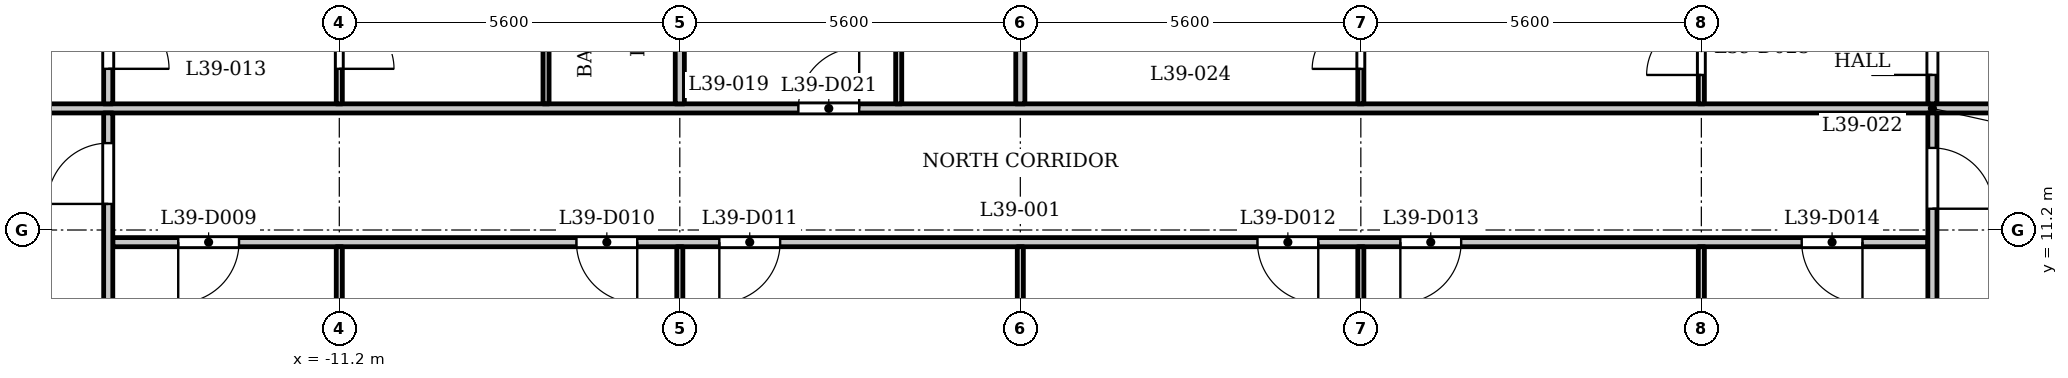
"""IFC4 building model, lengths in metres.
Left out: names, types, materials, properties, quantities, classifications, styles, units other than length and angle.
Written with IfcOpenShell. Run it as: python <this file> out.ifc"""

import sys

from ifc_helpers import new_model, si_unit, direction, frame, frame_2d, origin, place, context, subcontext, project, spatial, rectangle, extrude, element, fill, save


model = new_model("IFC4")
c1 = context("Model", 3, precision=1e-05, world=origin(), true_north=direction((0.0, 1.0)))
c2 = subcontext(c1, "Body", "Model", "MODEL_VIEW")
j1 = project(units=[si_unit("LENGTHUNIT", "METRE"), si_unit("PLANEANGLEUNIT", "RADIAN")], contexts=[c1])
p1 = place(None, origin())
s1 = spatial("IfcSite", under=j1, at=p1, CompositionType="ELEMENT")
p2 = place(p1, origin())
s2 = spatial("IfcBuilding", under=s1, at=p2, CompositionType="ELEMENT")
p3 = place(p2, frame((0.0, 0.0, 153.6)))
s3 = spatial("IfcBuildingStorey", under=s2, at=p3, CompositionType="ELEMENT", Elevation=153.6)
p4 = place(p3, frame((-14.925, 11.0, 0.0), z_axis=(0.0, 0.0, 1.0), x_axis=(1.0, 0.0, 0.0)))
e1 = element("IfcWall", 1, at=p4, inside=s3, PredefinedType="PARTITIONING", context=c2, shape_type="SweptSolid", body=[
    extrude(rectangle(XDim=29.85, YDim=0.15, at=frame_2d((14.925, 0.0))), origin(), (0.0, 0.0, 1.0), 3.2),
])
p5 = place(p4, frame((1.076, 0.0, 0.0)))
e2 = element("IfcOpeningElement", 2, at=p5, cuts=e1, PredefinedType="OPENING", context=c2, shape_type="SweptSolid", body=[
    extrude(rectangle(XDim=1.0, YDim=2.1, at=frame_2d((0.5, 1.05))), frame((0.0, 0.085, 0.0), z_axis=(0.0, -1.0, 0.0), x_axis=(1.0, 0.0, 0.0)), (0.0, 0.0, 1.0), 0.17),
])
p6 = place(p4, frame((7.625, 0.0, 0.0)))
e3 = element("IfcOpeningElement", 3, at=p6, cuts=e1, PredefinedType="OPENING", context=c2, shape_type="SweptSolid", body=[
    extrude(rectangle(XDim=1.0, YDim=2.1, at=frame_2d((0.5, 1.05))), frame((0.0, 0.085, 0.0), z_axis=(0.0, -1.0, 0.0), x_axis=(1.0, 0.0, 0.0)), (0.0, 0.0, 1.0), 0.17),
])
p7 = place(p4, frame((9.975, 0.0, 0.0)))
e4 = element("IfcOpeningElement", 4, at=p7, cuts=e1, PredefinedType="OPENING", context=c2, shape_type="SweptSolid", body=[
    extrude(rectangle(XDim=1.0, YDim=2.1, at=frame_2d((0.5, 1.05))), frame((0.0, 0.085, 0.0), z_axis=(0.0, -1.0, 0.0), x_axis=(1.0, 0.0, 0.0)), (0.0, 0.0, 1.0), 0.17),
])
p8 = place(p4, frame((18.825, 0.0, 0.0)))
e5 = element("IfcOpeningElement", 5, at=p8, cuts=e1, PredefinedType="OPENING", context=c2, shape_type="SweptSolid", body=[
    extrude(rectangle(XDim=1.0, YDim=2.1, at=frame_2d((0.5, 1.05))), frame((0.0, 0.085, 0.0), z_axis=(0.0, -1.0, 0.0), x_axis=(1.0, 0.0, 0.0)), (0.0, 0.0, 1.0), 0.17),
])
p9 = place(p4, frame((21.175, 0.0, 0.0)))
e6 = element("IfcOpeningElement", 6, at=p9, cuts=e1, PredefinedType="OPENING", context=c2, shape_type="SweptSolid", body=[
    extrude(rectangle(XDim=1.0, YDim=2.1, at=frame_2d((0.5, 1.05))), frame((0.0, 0.085, 0.0), z_axis=(0.0, -1.0, 0.0), x_axis=(1.0, 0.0, 0.0)), (0.0, 0.0, 1.0), 0.17),
])
p10 = place(p4, frame((27.775, 0.0, 0.0)))
e7 = element("IfcOpeningElement", 7, at=p10, cuts=e1, PredefinedType="OPENING", context=c2, shape_type="SweptSolid", body=[
    extrude(rectangle(XDim=1.0, YDim=2.1, at=frame_2d((0.5, 1.05))), frame((0.0, 0.085, 0.0), z_axis=(0.0, -1.0, 0.0), x_axis=(1.0, 0.0, 0.0)), (0.0, 0.0, 1.0), 0.17),
])
p11 = place(p3, frame((-17.4, 13.2, 0.0), z_axis=(0.0, 0.0, 1.0), x_axis=(1.0, 0.0, 0.0)))
e8 = element("IfcWall", 8, at=p11, inside=s3, PredefinedType="PARTITIONING", context=c2, shape_type="SweptSolid", body=[
    extrude(rectangle(XDim=34.8, YDim=0.15, at=frame_2d((17.4, 0.0))), origin(), (0.0, 0.0, 1.0), 3.2),
])
p12 = place(p11, frame((0.25, 0.0, 0.0)))
e9 = element("IfcOpeningElement", 9, at=p12, cuts=e8, PredefinedType="OPENING", context=c2, shape_type="SweptSolid", body=[
    extrude(rectangle(XDim=1.0, YDim=2.1, at=frame_2d((0.5, 1.05))), frame((0.0, 0.085, 0.0), z_axis=(0.0, -1.0, 0.0), x_axis=(1.0, 0.0, 0.0)), (0.0, 0.0, 1.0), 0.17),
])
p13 = place(p11, frame((33.65, 0.0, 0.0)))
e10 = element("IfcOpeningElement", 10, at=p13, cuts=e8, PredefinedType="OPENING", context=c2, shape_type="SweptSolid", body=[
    extrude(rectangle(XDim=1.0, YDim=2.1, at=frame_2d((0.5, 1.05))), frame((0.0, 0.085, 0.0), z_axis=(0.0, -1.0, 0.0), x_axis=(1.0, 0.0, 0.0)), (0.0, 0.0, 1.0), 0.17),
])
p14 = place(p11, frame((13.75, 0.0, 0.0)))
e11 = element("IfcOpeningElement", 11, at=p14, cuts=e8, PredefinedType="OPENING", context=c2, shape_type="SweptSolid", body=[
    extrude(rectangle(XDim=1.0, YDim=2.1, at=frame_2d((0.5, 1.05))), frame((0.0, 0.085, 0.0), z_axis=(0.0, -1.0, 0.0), x_axis=(1.0, 0.0, 0.0)), (0.0, 0.0, 1.0), 0.17),
])
p15 = place(p3, frame((-15.0, 6.769, 0.0), z_axis=(0.0, 0.0, 1.0), x_axis=(0.0, 1.0, 0.0)))
e12 = element("IfcWall", 12, at=p15, inside=s3, PredefinedType="PARTITIONING", context=c2, shape_type="SweptSolid", body=[
    extrude(rectangle(XDim=6.356, YDim=0.15, at=frame_2d((3.178, 0.0))), origin(), (0.0, 0.0, 1.0), 3.2),
])
p16 = place(p15, frame((4.86, 0.0, 0.0)))
e13 = element("IfcOpeningElement", 13, at=p16, cuts=e12, PredefinedType="OPENING", context=c2, shape_type="SweptSolid", body=[
    extrude(rectangle(XDim=1.0, YDim=2.1, at=frame_2d((0.5, 1.05))), frame((0.0, 0.085, 0.0), z_axis=(0.0, -1.0, 0.0), x_axis=(1.0, 0.0, 0.0)), (0.0, 0.0, 1.0), 0.17),
])
p17 = place(p3, frame((-15.0, 13.275, 0.0), z_axis=(0.0, 0.0, 1.0), x_axis=(0.0, 1.0, 0.0)))
e14 = element("IfcWall", 14, at=p17, inside=s3, PredefinedType="PARTITIONING", context=c2, shape_type="SweptSolid", body=[
    extrude(rectangle(XDim=2.05, YDim=0.15, at=frame_2d((1.025, 0.0))), origin(), (0.0, 0.0, 1.0), 3.2),
])
p18 = place(p17, frame((0.576, 0.0, 0.0)))
e15 = element("IfcOpeningElement", 15, at=p18, cuts=e14, PredefinedType="OPENING", context=c2, shape_type="SweptSolid", body=[
    extrude(rectangle(XDim=1.0, YDim=2.1, at=frame_2d((0.5, 1.05))), frame((0.0, 0.085, 0.0), z_axis=(0.0, -1.0, 0.0), x_axis=(1.0, 0.0, 0.0)), (0.0, 0.0, 1.0), 0.17),
])
p19 = place(p3, frame((-11.2, 7.32, 0.0), z_axis=(0.0, 0.0, 1.0), x_axis=(0.0, 1.0, 0.0)))
e16 = element("IfcWall", 16, at=p19, inside=s3, PredefinedType="PARTITIONING", context=c2, shape_type="SweptSolid", body=[
    extrude(rectangle(XDim=3.605, YDim=0.1, at=frame_2d((1.802, 0.0))), origin(), (0.0, 0.0, 1.0), 3.2),
])
p20 = place(p3, frame((-11.2, 13.275, 0.0), z_axis=(0.0, 0.0, 1.0), x_axis=(0.0, 1.0, 0.0)))
e17 = element("IfcWall", 17, at=p20, inside=s3, PredefinedType="PARTITIONING", context=c2, shape_type="SweptSolid", body=[
    extrude(rectangle(XDim=3.475, YDim=0.1, at=frame_2d((1.738, 0.0))), origin(), (0.0, 0.0, 1.0), 3.2),
])
p21 = place(p20, frame((0.576, 0.0, 0.0)))
e18 = element("IfcOpeningElement", 18, at=p21, cuts=e17, PredefinedType="OPENING", context=c2, shape_type="SweptSolid", body=[
    extrude(rectangle(XDim=0.9, YDim=2.1, at=frame_2d((0.45, 1.05))), frame((0.0, 0.06, 0.0), z_axis=(0.0, -1.0, 0.0), x_axis=(1.0, 0.0, 0.0)), (0.0, 0.0, 1.0), 0.12),
])
p22 = place(p3, frame((-7.8, 13.275, 0.0), z_axis=(0.0, 0.0, 1.0), x_axis=(0.0, 1.0, 0.0)))
e19 = element("IfcWall", 19, at=p22, inside=s3, PredefinedType="PARTITIONING", context=c2, shape_type="SweptSolid", body=[
    extrude(rectangle(XDim=3.475, YDim=0.1, at=frame_2d((1.738, 0.0))), origin(), (0.0, 0.0, 1.0), 3.2),
])
p23 = place(p3, frame((-5.6, 7.32, 0.0), z_axis=(0.0, 0.0, 1.0), x_axis=(0.0, 1.0, 0.0)))
e20 = element("IfcWall", 20, at=p23, inside=s3, PredefinedType="PARTITIONING", context=c2, shape_type="SweptSolid", body=[
    extrude(rectangle(XDim=3.605, YDim=0.1, at=frame_2d((1.802, 0.0))), origin(), (0.0, 0.0, 1.0), 3.2),
])
p24 = place(p3, frame((-5.6, 13.275, 0.0), z_axis=(0.0, 0.0, 1.0), x_axis=(0.0, 1.0, 0.0)))
e21 = element("IfcWall", 21, at=p24, inside=s3, PredefinedType="PARTITIONING", context=c2, shape_type="SweptSolid", body=[
    extrude(rectangle(XDim=3.475, YDim=0.15, at=frame_2d((1.738, 0.0))), origin(), (0.0, 0.0, 1.0), 3.2),
])
p25 = place(p3, frame((-2.0, 13.275, 0.0), z_axis=(0.0, 0.0, 1.0), x_axis=(0.0, 1.0, 0.0)))
e22 = element("IfcWall", 22, at=p25, inside=s3, PredefinedType="PARTITIONING", context=c2, shape_type="SweptSolid", body=[
    extrude(rectangle(XDim=3.475, YDim=0.1, at=frame_2d((1.738, 0.0))), origin(), (0.0, 0.0, 1.0), 3.2),
])
p26 = place(p3, frame((0.0, 7.32, 0.0), z_axis=(0.0, 0.0, 1.0), x_axis=(0.0, 1.0, 0.0)))
e23 = element("IfcWall", 23, at=p26, inside=s3, PredefinedType="PARTITIONING", context=c2, shape_type="SweptSolid", body=[
    extrude(rectangle(XDim=3.605, YDim=0.1, at=frame_2d((1.802, 0.0))), origin(), (0.0, 0.0, 1.0), 3.2),
])
p27 = place(p3, frame((0.0, 13.275, 0.0), z_axis=(0.0, 0.0, 1.0), x_axis=(0.0, 1.0, 0.0)))
e24 = element("IfcWall", 24, at=p27, inside=s3, PredefinedType="PARTITIONING", context=c2, shape_type="SweptSolid", body=[
    extrude(rectangle(XDim=3.475, YDim=0.15, at=frame_2d((1.738, 0.0))), origin(), (0.0, 0.0, 1.0), 3.2),
])
p28 = place(p3, frame((5.6, 7.32, 0.0), z_axis=(0.0, 0.0, 1.0), x_axis=(0.0, 1.0, 0.0)))
e25 = element("IfcWall", 25, at=p28, inside=s3, PredefinedType="PARTITIONING", context=c2, shape_type="SweptSolid", body=[
    extrude(rectangle(XDim=3.605, YDim=0.1, at=frame_2d((1.802, 0.0))), origin(), (0.0, 0.0, 1.0), 3.2),
])
p29 = place(p3, frame((5.6, 13.275, 0.0), z_axis=(0.0, 0.0, 1.0), x_axis=(0.0, 1.0, 0.0)))
e26 = element("IfcWall", 26, at=p29, inside=s3, PredefinedType="PARTITIONING", context=c2, shape_type="SweptSolid", body=[
    extrude(rectangle(XDim=3.475, YDim=0.1, at=frame_2d((1.738, 0.0))), origin(), (0.0, 0.0, 1.0), 3.2),
])
p30 = place(p29, frame((0.575, 0.0, 0.0)))
e27 = element("IfcOpeningElement", 27, at=p30, cuts=e26, PredefinedType="OPENING", context=c2, shape_type="SweptSolid", body=[
    extrude(rectangle(XDim=0.8, YDim=2.1, at=frame_2d((0.4, 1.05))), frame((0.0, 0.06, 0.0), z_axis=(0.0, -1.0, 0.0), x_axis=(1.0, 0.0, 0.0)), (0.0, 0.0, 1.0), 0.12),
])
p31 = place(p3, frame((11.2, 7.32, 0.0), z_axis=(0.0, 0.0, 1.0), x_axis=(0.0, 1.0, 0.0)))
e28 = element("IfcWall", 28, at=p31, inside=s3, PredefinedType="PARTITIONING", context=c2, shape_type="SweptSolid", body=[
    extrude(rectangle(XDim=3.605, YDim=0.1, at=frame_2d((1.802, 0.0))), origin(), (0.0, 0.0, 1.0), 3.2),
])
p32 = place(p3, frame((11.2, 13.275, 0.0), z_axis=(0.0, 0.0, 1.0), x_axis=(0.0, 1.0, 0.0)))
e29 = element("IfcWall", 29, at=p32, inside=s3, PredefinedType="PARTITIONING", context=c2, shape_type="SweptSolid", body=[
    extrude(rectangle(XDim=3.475, YDim=0.1, at=frame_2d((1.738, 0.0))), origin(), (0.0, 0.0, 1.0), 3.2),
])
p33 = place(p32, frame((0.475, 0.0, 0.0)))
e30 = element("IfcOpeningElement", 30, at=p33, cuts=e29, PredefinedType="OPENING", context=c2, shape_type="SweptSolid", body=[
    extrude(rectangle(XDim=0.9, YDim=2.1, at=frame_2d((0.45, 1.05))), frame((0.0, 0.06, 0.0), z_axis=(0.0, -1.0, 0.0), x_axis=(1.0, 0.0, 0.0)), (0.0, 0.0, 1.0), 0.12),
])
p34 = place(p3, frame((15.0, 6.769, 0.0), z_axis=(0.0, 0.0, 1.0), x_axis=(0.0, 1.0, 0.0)))
e31 = element("IfcWall", 31, at=p34, inside=s3, PredefinedType="PARTITIONING", context=c2, shape_type="SweptSolid", body=[
    extrude(rectangle(XDim=6.356, YDim=0.15, at=frame_2d((3.178, 0.0))), origin(), (0.0, 0.0, 1.0), 3.2),
])
p35 = place(p34, frame((4.781, 0.0, 0.0)))
e32 = element("IfcOpeningElement", 32, at=p35, cuts=e31, PredefinedType="OPENING", context=c2, shape_type="SweptSolid", body=[
    extrude(rectangle(XDim=1.0, YDim=2.1, at=frame_2d((0.5, 1.05))), frame((0.0, 0.085, 0.0), z_axis=(0.0, -1.0, 0.0), x_axis=(1.0, 0.0, 0.0)), (0.0, 0.0, 1.0), 0.17),
])
p36 = place(p3, frame((15.0, 13.275, 0.0), z_axis=(0.0, 0.0, 1.0), x_axis=(0.0, 1.0, 0.0)))
e33 = element("IfcWall", 33, at=p36, inside=s3, PredefinedType="PARTITIONING", context=c2, shape_type="SweptSolid", body=[
    extrude(rectangle(XDim=2.05, YDim=0.15, at=frame_2d((1.025, 0.0))), origin(), (0.0, 0.0, 1.0), 3.2),
])
p37 = place(p36, frame((0.476, 0.0, 0.0)))
e34 = element("IfcOpeningElement", 34, at=p37, cuts=e33, PredefinedType="OPENING", context=c2, shape_type="SweptSolid", body=[
    extrude(rectangle(XDim=1.0, YDim=2.1, at=frame_2d((0.5, 1.05))), frame((0.0, 0.085, 0.0), z_axis=(0.0, -1.0, 0.0), x_axis=(1.0, 0.0, 0.0)), (0.0, 0.0, 1.0), 0.17),
])
p38 = place(p16, origin())
e35 = element("IfcDoor", 35, at=p38, inside=s3, OperationType="SINGLE_SWING_RIGHT", PredefinedType="DOOR", context=c2, shape_type="SweptSolid", body=[
    extrude(rectangle(XDim=1.0, YDim=2.1, at=frame_2d((0.5, 1.05))), frame((0.0, 0.025, 0.0), z_axis=(0.0, -1.0, 0.0), x_axis=(1.0, 0.0, 0.0)), (0.0, 0.0, 1.0), 0.05),
])
fill(e13, e35)
p39 = place(p35, origin())
e36 = element("IfcDoor", 36, at=p39, inside=s3, OperationType="SINGLE_SWING_LEFT", PredefinedType="DOOR", context=c2, shape_type="SweptSolid", body=[
    extrude(rectangle(XDim=1.0, YDim=2.1, at=frame_2d((0.5, 1.05))), frame((0.0, 0.025, 0.0), z_axis=(0.0, -1.0, 0.0), x_axis=(1.0, 0.0, 0.0)), (0.0, 0.0, 1.0), 0.05),
])
fill(e32, e36)
p40 = place(p5, origin())
e37 = element("IfcDoor", 37, at=p40, inside=s3, OperationType="SINGLE_SWING_LEFT", PredefinedType="DOOR", context=c2, shape_type="SweptSolid", body=[
    extrude(rectangle(XDim=1.0, YDim=2.1, at=frame_2d((0.5, 1.05))), frame((0.0, 0.025, 0.0), z_axis=(0.0, -1.0, 0.0), x_axis=(1.0, 0.0, 0.0)), (0.0, 0.0, 1.0), 0.05),
])
fill(e2, e37)
p41 = place(p6, origin())
e38 = element("IfcDoor", 38, at=p41, inside=s3, OperationType="SINGLE_SWING_RIGHT", PredefinedType="DOOR", context=c2, shape_type="SweptSolid", body=[
    extrude(rectangle(XDim=1.0, YDim=2.1, at=frame_2d((0.5, 1.05))), frame((0.0, 0.025, 0.0), z_axis=(0.0, -1.0, 0.0), x_axis=(1.0, 0.0, 0.0)), (0.0, 0.0, 1.0), 0.05),
])
fill(e3, e38)
p42 = place(p7, origin())
e39 = element("IfcDoor", 39, at=p42, inside=s3, OperationType="SINGLE_SWING_LEFT", PredefinedType="DOOR", context=c2, shape_type="SweptSolid", body=[
    extrude(rectangle(XDim=1.0, YDim=2.1, at=frame_2d((0.5, 1.05))), frame((0.0, 0.025, 0.0), z_axis=(0.0, -1.0, 0.0), x_axis=(1.0, 0.0, 0.0)), (0.0, 0.0, 1.0), 0.05),
])
fill(e4, e39)
p43 = place(p8, origin())
e40 = element("IfcDoor", 40, at=p43, inside=s3, OperationType="SINGLE_SWING_RIGHT", PredefinedType="DOOR", context=c2, shape_type="SweptSolid", body=[
    extrude(rectangle(XDim=1.0, YDim=2.1, at=frame_2d((0.5, 1.05))), frame((0.0, 0.025, 0.0), z_axis=(0.0, -1.0, 0.0), x_axis=(1.0, 0.0, 0.0)), (0.0, 0.0, 1.0), 0.05),
])
fill(e5, e40)
p44 = place(p9, origin())
e41 = element("IfcDoor", 41, at=p44, inside=s3, OperationType="SINGLE_SWING_LEFT", PredefinedType="DOOR", context=c2, shape_type="SweptSolid", body=[
    extrude(rectangle(XDim=1.0, YDim=2.1, at=frame_2d((0.5, 1.05))), frame((0.0, 0.025, 0.0), z_axis=(0.0, -1.0, 0.0), x_axis=(1.0, 0.0, 0.0)), (0.0, 0.0, 1.0), 0.05),
])
fill(e6, e41)
p45 = place(p10, origin())
e42 = element("IfcDoor", 42, at=p45, inside=s3, OperationType="SINGLE_SWING_RIGHT", PredefinedType="DOOR", context=c2, shape_type="SweptSolid", body=[
    extrude(rectangle(XDim=1.0, YDim=2.1, at=frame_2d((0.5, 1.05))), frame((0.0, 0.025, 0.0), z_axis=(0.0, -1.0, 0.0), x_axis=(1.0, 0.0, 0.0)), (0.0, 0.0, 1.0), 0.05),
])
fill(e7, e42)
p46 = place(p18, origin())
e43 = element("IfcDoor", 43, at=p46, inside=s3, OperationType="SINGLE_SWING_LEFT", PredefinedType="DOOR", context=c2, shape_type="SweptSolid", body=[
    extrude(rectangle(XDim=1.0, YDim=2.1, at=frame_2d((0.5, 1.05))), frame((0.0, 0.025, 0.0), z_axis=(0.0, -1.0, 0.0), x_axis=(1.0, 0.0, 0.0)), (0.0, 0.0, 1.0), 0.05),
])
fill(e15, e43)
p47 = place(p21, origin())
e44 = element("IfcDoor", 44, at=p47, inside=s3, OperationType="SINGLE_SWING_LEFT", PredefinedType="DOOR", context=c2, shape_type="SweptSolid", body=[
    extrude(rectangle(XDim=0.9, YDim=2.1, at=frame_2d((0.45, 1.05))), frame((0.0, 0.025, 0.0), z_axis=(0.0, -1.0, 0.0), x_axis=(1.0, 0.0, 0.0)), (0.0, 0.0, 1.0), 0.05),
])
fill(e18, e44)
p48 = place(p14, origin())
e45 = element("IfcDoor", 45, at=p48, inside=s3, OperationType="SINGLE_SWING_LEFT", PredefinedType="DOOR", context=c2, shape_type="SweptSolid", body=[
    extrude(rectangle(XDim=1.0, YDim=2.1, at=frame_2d((0.5, 1.05))), frame((0.0, 0.025, 0.0), z_axis=(0.0, -1.0, 0.0), x_axis=(1.0, 0.0, 0.0)), (0.0, 0.0, 1.0), 0.05),
])
fill(e11, e45)
p49 = place(p37, origin())
e46 = element("IfcDoor", 46, at=p49, inside=s3, OperationType="SINGLE_SWING_RIGHT", PredefinedType="DOOR", context=c2, shape_type="SweptSolid", body=[
    extrude(rectangle(XDim=1.0, YDim=2.1, at=frame_2d((0.5, 1.05))), frame((0.0, 0.025, 0.0), z_axis=(0.0, -1.0, 0.0), x_axis=(1.0, 0.0, 0.0)), (0.0, 0.0, 1.0), 0.05),
])
fill(e34, e46)
p50 = place(p33, origin())
e47 = element("IfcDoor", 47, at=p50, inside=s3, OperationType="SINGLE_SWING_RIGHT", PredefinedType="DOOR", context=c2, shape_type="SweptSolid", body=[
    extrude(rectangle(XDim=0.9, YDim=2.1, at=frame_2d((0.45, 1.05))), frame((0.0, 0.025, 0.0), z_axis=(0.0, -1.0, 0.0), x_axis=(1.0, 0.0, 0.0)), (0.0, 0.0, 1.0), 0.05),
])
fill(e30, e47)
p51 = place(p30, origin())
e48 = element("IfcDoor", 48, at=p51, inside=s3, OperationType="SINGLE_SWING_RIGHT", PredefinedType="DOOR", context=c2, shape_type="SweptSolid", body=[
    extrude(rectangle(XDim=0.8, YDim=2.1, at=frame_2d((0.4, 1.05))), frame((0.0, 0.025, 0.0), z_axis=(0.0, -1.0, 0.0), x_axis=(1.0, 0.0, 0.0)), (0.0, 0.0, 1.0), 0.05),
])
fill(e27, e48)
save(model, sys.argv[1])
